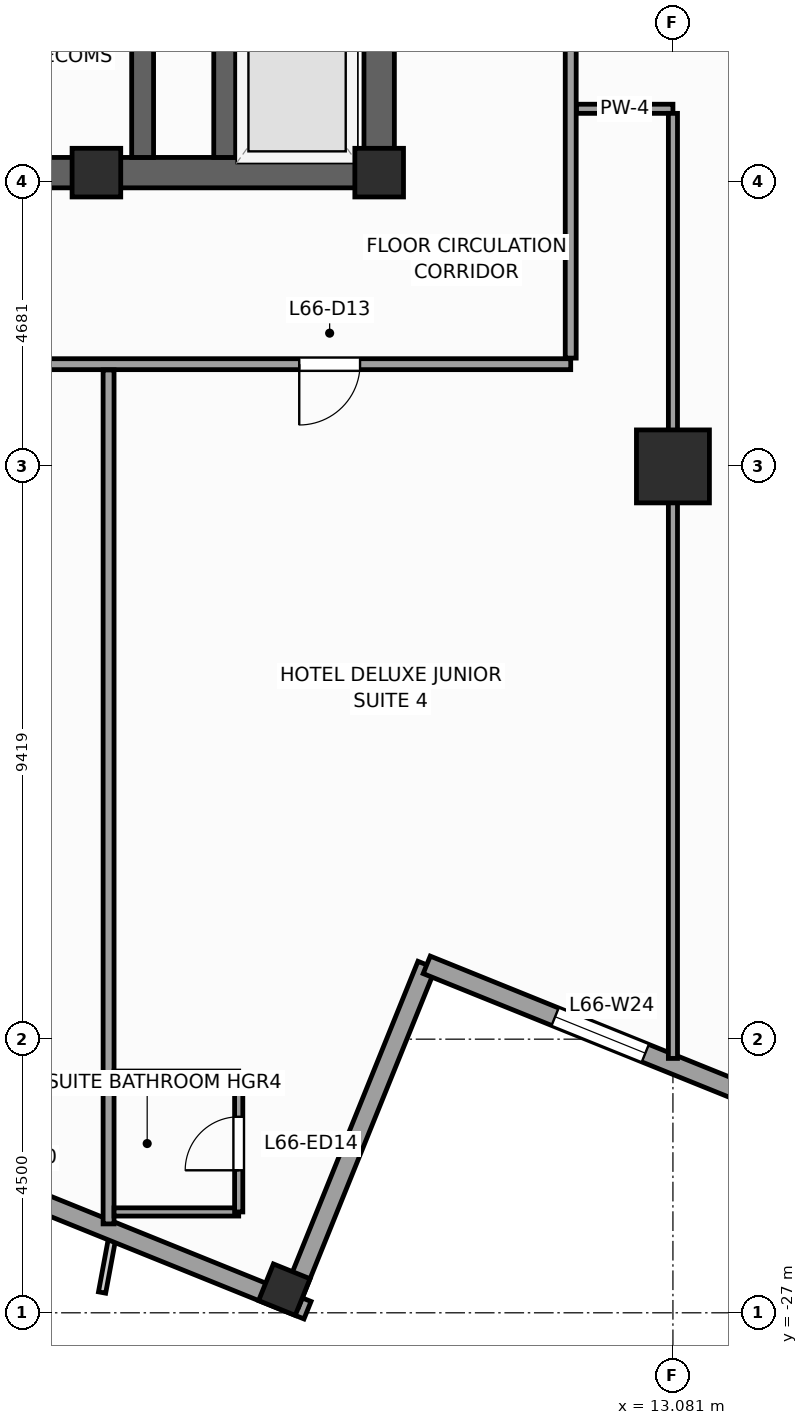
"""IFC4 building model, lengths in metres.
Left out: names, types, materials, properties, quantities, classifications, styles, units other than length and angle.
Written with IfcOpenShell. Run it as: python <this file> out.ifc"""

import sys

from ifc_helpers import new_model, si_unit, direction, frame, frame_2d, origin, origin_2d, place, context, subcontext, project, spatial, rectangle, extrude, source, transform, mapped, element, fill, save


model = new_model("IFC4")
c1 = context("Model", 3, precision=1e-05, world=origin(), true_north=direction((0.0, 1.0)))
c2 = subcontext(c1, "Body", "Model", "MODEL_VIEW")
j1 = project(units=[si_unit("LENGTHUNIT", "METRE"), si_unit("PLANEANGLEUNIT", "RADIAN")], contexts=[c1])
p1 = place(None, origin())
s1 = spatial("IfcSite", under=j1, at=p1, CompositionType="ELEMENT")
p2 = place(p1, origin())
s2 = spatial("IfcBuilding", under=s1, at=p2, CompositionType="ELEMENT")
p3 = place(p2, frame((0.0, 0.0, 272.4)))
s3 = spatial("IfcBuildingStorey", under=s2, at=p3, CompositionType="ELEMENT", Elevation=272.4)
p4 = place(p3, frame((-8.5, -8.25, 0.0), z_axis=(0.0, 0.0, 1.0), x_axis=(1.0, 0.0, 0.0)))
e1 = element("IfcWall", 1, at=p4, inside=s3, PredefinedType="SHEAR", context=c2, shape_type="SweptSolid", body=[
    extrude(rectangle(XDim=17.0, YDim=0.5, at=frame_2d((8.5, 0.0))), origin(), (0.0, 0.0, 1.0), 3.6),
])
p5 = place(p4, frame((7.85, 0.0, 0.0)))
e2 = element("IfcOpeningElement", 2, at=p5, cuts=e1, PredefinedType="OPENING", context=c2, shape_type="SweptSolid", body=[
    extrude(rectangle(XDim=1.3, YDim=2.2, at=frame_2d((0.65, 1.1))), frame((0.0, 0.26, 0.0), z_axis=(0.0, -1.0, 0.0), x_axis=(1.0, 0.0, 0.0)), (0.0, 0.0, 1.0), 0.52),
])
p6 = place(p3, frame((8.25, -8.0, 0.0), z_axis=(0.0, 0.0, 1.0), x_axis=(0.0, 1.0, 0.0)))
e3 = element("IfcWall", 3, at=p6, inside=s3, PredefinedType="SHEAR", context=c2, shape_type="SweptSolid", body=[
    extrude(rectangle(XDim=16.0, YDim=0.5, at=frame_2d((8.0, 0.0))), origin(), (0.0, 0.0, 1.0), 3.6),
])
p7 = place(p6, frame((4.69, 0.0, 0.0)))
e4 = element("IfcOpeningElement", 4, at=p7, cuts=e3, PredefinedType="OPENING", context=c2, shape_type="SweptSolid", body=[
    extrude(rectangle(XDim=1.3, YDim=2.2, at=frame_2d((0.65, 1.1))), frame((0.0, 0.26, 0.0), z_axis=(0.0, -1.0, 0.0), x_axis=(1.0, 0.0, 0.0)), (0.0, 0.0, 1.0), 0.52),
])
p8 = place(p3, frame((4.36, -8.0, 0.0), z_axis=(0.0, 0.0, 1.0), x_axis=(0.0, 1.0, 0.0)))
e5 = element("IfcWall", 5, at=p8, inside=s3, PredefinedType="SHEAR", context=c2, shape_type="SweptSolid", body=[
    extrude(rectangle(XDim=16.0, YDim=0.36, at=frame_2d((8.0, 0.0))), origin(), (0.0, 0.0, 1.0), 3.6),
])
p9 = place(p3, frame((5.71, -8.0, 0.0), z_axis=(0.0, 0.0, 1.0), x_axis=(0.0, 1.0, 0.0)))
e6 = element("IfcWall", 6, at=p9, inside=s3, PredefinedType="SHEAR", context=c2, shape_type="SweptSolid", body=[
    extrude(rectangle(XDim=2.54, YDim=0.36, at=frame_2d((1.27, 0.0))), origin(), (0.0, 0.0, 1.0), 3.6),
])
m1 = source(origin(), c2, "Body", "SweptSolid", [
    extrude(rectangle(XDim=0.8, YDim=0.8, at=origin_2d()), origin(), (0.0, 0.0, 1.0), 3.6),
])
for number, where, z_axis, x_axis in (
    (7, (8.25, -8.25, 0.0), (0.0, 0.0, 1.0), (1.0, 0.0, 0.0)),
    (8, (3.6, -8.25, 0.0), (0.0, 0.0, 1.0), (1.0, 0.0, 0.0)),
):
    element("IfcColumn", number, at=place(p3, frame(where, z_axis=z_axis, x_axis=x_axis)), inside=s3, PredefinedType="PILASTER", context=c2, shape_type="MappedRepresentation", body=[
        mapped(m1, transform((0.0, 0.0, 0.0), scale=1.0)),
    ])
m2 = source(origin(), c2, "Body", "SweptSolid", [
    extrude(rectangle(XDim=1.2, YDim=1.2, at=origin_2d()), origin(), (0.0, 0.0, 1.0), 3.6),
])
p10 = place(p3, frame((13.081, -13.081, 0.0), z_axis=(0.0, 0.0, 1.0), x_axis=(1.0, 0.0, 0.0)))
e9 = element("IfcColumn", 9, at=p10, inside=s3, PredefinedType="COLUMN", context=c2, shape_type="MappedRepresentation", body=[
    mapped(m2, transform((0.0, 0.0, 0.0), scale=1.0)),
])
m3 = source(origin(), c2, "Body", "SweptSolid", [
    extrude(rectangle(XDim=0.65, YDim=0.65, at=origin_2d()), origin(), (0.0, 0.0, 1.0), 3.6),
])
p11 = place(p3, frame((6.69, -26.62, 0.0), z_axis=(0.0, 0.0, 1.0), x_axis=(0.374606593416, 0.927183854567, 0.0)))
e10 = element("IfcColumn", 10, at=p11, inside=s3, PredefinedType="COLUMN", context=c2, shape_type="MappedRepresentation", body=[
    mapped(m3, transform((0.0, 0.0, 0.0), scale=1.0)),
])
p12 = place(p3, frame((-23.813, -14.479, 0.0), z_axis=(0.0, 0.0, 1.0), x_axis=(0.927182657188, -0.374609557019, 0.0)))
e11 = element("IfcWall", 11, at=p12, inside=s3, PredefinedType="STANDARD", context=c2, shape_type="SweptSolid", body=[
    extrude(rectangle(XDim=33.31, YDim=0.31, at=frame_2d((16.655, 0.0))), origin(), (0.0, 0.0, 1.0), 2.75),
])
p13 = place(p12, frame((3.197, 0.0, 0.47)))
e12 = element("IfcOpeningElement", 12, at=p13, cuts=e11, PredefinedType="OPENING", context=c2, shape_type="SweptSolid", body=[
    extrude(rectangle(XDim=1.6, YDim=2.1, at=frame_2d((0.8, 1.05))), frame((0.0, 0.165, 0.0), z_axis=(0.0, -1.0, 0.0), x_axis=(1.0, 0.0, 0.0)), (0.0, 0.0, 1.0), 0.33),
])
p14 = place(p12, frame((8.86, 0.0, 0.47)))
e13 = element("IfcOpeningElement", 13, at=p14, cuts=e11, PredefinedType="OPENING", context=c2, shape_type="SweptSolid", body=[
    extrude(rectangle(XDim=1.6, YDim=2.1, at=frame_2d((0.8, 1.05))), frame((0.0, 0.165, 0.0), z_axis=(0.0, -1.0, 0.0), x_axis=(1.0, 0.0, 0.0)), (0.0, 0.0, 1.0), 0.33),
])
p15 = place(p12, frame((14.439, 0.0, 0.47)))
e14 = element("IfcOpeningElement", 14, at=p15, cuts=e11, PredefinedType="OPENING", context=c2, shape_type="SweptSolid", body=[
    extrude(rectangle(XDim=1.6, YDim=2.1, at=frame_2d((0.8, 1.05))), frame((0.0, 0.165, 0.0), z_axis=(0.0, -1.0, 0.0), x_axis=(1.0, 0.0, 0.0)), (0.0, 0.0, 1.0), 0.33),
])
p16 = place(p12, frame((22.601, 0.0, 0.47)))
e15 = element("IfcOpeningElement", 15, at=p16, cuts=e11, PredefinedType="OPENING", context=c2, shape_type="SweptSolid", body=[
    extrude(rectangle(XDim=1.6, YDim=2.1, at=frame_2d((0.8, 1.05))), frame((0.0, 0.165, 0.0), z_axis=(0.0, -1.0, 0.0), x_axis=(1.0, 0.0, 0.0)), (0.0, 0.0, 1.0), 0.33),
])
p17 = place(p12, frame((27.097, 0.0, 0.47)))
e16 = element("IfcOpeningElement", 16, at=p17, cuts=e11, PredefinedType="OPENING", context=c2, shape_type="SweptSolid", body=[
    extrude(rectangle(XDim=1.6, YDim=2.1, at=frame_2d((0.8, 1.05))), frame((0.0, 0.165, 0.0), z_axis=(0.0, -1.0, 0.0), x_axis=(1.0, 0.0, 0.0)), (0.0, 0.0, 1.0), 0.33),
])
p18 = place(p3, frame((6.784, -26.841, 0.0), z_axis=(0.0, 0.0, 1.0), x_axis=(0.374636620962, 0.927171722085, 0.0)))
e17 = element("IfcWall", 17, at=p18, inside=s3, PredefinedType="STANDARD", context=c2, shape_type="SweptSolid", body=[
    extrude(rectangle(XDim=6.0, YDim=0.31, at=frame_2d((3.0, 0.0))), origin(), (0.0, 0.0, 1.0), 2.65),
])
p19 = place(p3, frame((9.032, -21.278, 0.0), z_axis=(0.0, 0.0, 1.0), x_axis=(0.927185411764, -0.374602739196, 0.0)))
e18 = element("IfcWall", 18, at=p19, inside=s3, PredefinedType="STANDARD", context=c2, shape_type="SweptSolid", body=[
    extrude(rectangle(XDim=6.155, YDim=0.31, at=frame_2d((3.078, 0.0))), origin(), (0.0, 0.0, 1.0), 3.35),
])
p20 = place(p19, frame((2.278, 0.0, 0.47)))
e19 = element("IfcOpeningElement", 19, at=p20, cuts=e18, PredefinedType="OPENING", context=c2, shape_type="SweptSolid", body=[
    extrude(rectangle(XDim=1.6, YDim=2.1, at=frame_2d((0.8, 1.05))), frame((0.0, 0.165, 0.0), z_axis=(0.0, -1.0, 0.0), x_axis=(1.0, 0.0, 0.0)), (0.0, 0.0, 1.0), 0.33),
])
p21 = place(p3, frame((-10.3, -11.4, 0.0), z_axis=(0.0, 0.0, 1.0), x_axis=(1.0, 0.0, 0.0)))
e20 = element("IfcWall", 20, at=p21, inside=s3, PredefinedType="PARTITIONING", context=c2, shape_type="SweptSolid", body=[
    extrude(rectangle(XDim=21.7, YDim=0.18, at=frame_2d((10.85, 0.0))), origin(), (0.0, 0.0, 1.0), 3.35),
])
p22 = place(p21, frame((1.605, 0.0, 0.0)))
e21 = element("IfcOpeningElement", 21, at=p22, cuts=e20, PredefinedType="OPENING", context=c2, shape_type="SweptSolid", body=[
    extrude(rectangle(XDim=0.95, YDim=2.1, at=frame_2d((0.475, 1.05))), frame((0.0, 0.1, 0.0), z_axis=(0.0, -1.0, 0.0), x_axis=(1.0, 0.0, 0.0)), (0.0, 0.0, 1.0), 0.2),
])
p23 = place(p21, frame((17.236, 0.0, 0.0)))
e22 = element("IfcOpeningElement", 22, at=p23, cuts=e20, PredefinedType="OPENING", context=c2, shape_type="SweptSolid", body=[
    extrude(rectangle(XDim=1.0, YDim=2.15, at=frame_2d((0.5, 1.075))), frame((0.0, 0.1, 0.0), z_axis=(0.0, -1.0, 0.0), x_axis=(1.0, 0.0, 0.0)), (0.0, 0.0, 1.0), 0.2),
])
p24 = place(p21, frame((9.8, 0.0, 0.0)))
e23 = element("IfcOpeningElement", 23, at=p24, cuts=e20, PredefinedType="OPENING", context=c2, shape_type="SweptSolid", body=[
    extrude(rectangle(XDim=1.0, YDim=2.15, at=frame_2d((0.5, 1.075))), frame((0.0, 0.1, 0.0), z_axis=(0.0, -1.0, 0.0), x_axis=(1.0, 0.0, 0.0)), (0.0, 0.0, 1.0), 0.2),
])
p25 = place(p3, frame((11.4, -11.3, 0.0), z_axis=(0.0, 0.0, 1.0), x_axis=(0.0, 1.0, 0.0)))
e24 = element("IfcWall", 24, at=p25, inside=s3, PredefinedType="PARTITIONING", context=c2, shape_type="SweptSolid", body=[
    extrude(rectangle(XDim=21.5, YDim=0.18, at=frame_2d((10.75, 0.0))), origin(), (0.0, 0.0, 1.0), 3.35),
])
p26 = place(p25, frame((17.536, 0.0, 0.0)))
e25 = element("IfcOpeningElement", 25, at=p26, cuts=e24, PredefinedType="OPENING", context=c2, shape_type="SweptSolid", body=[
    extrude(rectangle(XDim=1.0, YDim=2.15, at=frame_2d((0.5, 1.075))), frame((0.0, 0.1, 0.0), z_axis=(0.0, -1.0, 0.0), x_axis=(1.0, 0.0, 0.0)), (0.0, 0.0, 1.0), 0.2),
])
p27 = place(p25, frame((10.8, 0.0, 0.0)))
e26 = element("IfcOpeningElement", 26, at=p27, cuts=e24, PredefinedType="OPENING", context=c2, shape_type="SweptSolid", body=[
    extrude(rectangle(XDim=1.0, YDim=2.15, at=frame_2d((0.5, 1.075))), frame((0.0, 0.1, 0.0), z_axis=(0.0, -1.0, 0.0), x_axis=(1.0, 0.0, 0.0)), (0.0, 0.0, 1.0), 0.2),
])
p28 = place(p25, frame((5.4, 0.0, 0.0)))
e27 = element("IfcOpeningElement", 27, at=p28, cuts=e24, PredefinedType="OPENING", context=c2, shape_type="SweptSolid", body=[
    extrude(rectangle(XDim=1.0, YDim=2.15, at=frame_2d((0.5, 1.075))), frame((0.0, 0.1, 0.0), z_axis=(0.0, -1.0, 0.0), x_axis=(1.0, 0.0, 0.0)), (0.0, 0.0, 1.0), 0.2),
])
p29 = place(p3, frame((3.8, -11.495, 0.0), z_axis=(0.0, 0.0, 1.0), x_axis=(0.0, -1.0, 0.0)))
e28 = element("IfcWall", 28, at=p29, inside=s3, PredefinedType="PARTITIONING", context=c2, shape_type="SweptSolid", body=[
    extrude(rectangle(XDim=14.043, YDim=0.18, at=frame_2d((7.021, 0.0))), origin(), (0.0, 0.0, 1.0), 3.35),
])
p30 = place(p3, frame((11.495, -7.2, 0.0), z_axis=(0.0, 0.0, 1.0), x_axis=(1.0, 0.0, 0.0)))
e29 = element("IfcWall", 29, at=p30, inside=s3, PredefinedType="PARTITIONING", context=c2, shape_type="SweptSolid", body=[
    extrude(rectangle(XDim=1.586, YDim=0.15, at=frame_2d((0.793, 0.0))), origin(), (0.0, 0.0, 1.0), 3.35),
])
p31 = place(p3, frame((13.081, -7.275, 0.0), z_axis=(0.0, 0.0, 1.0), x_axis=(0.0, -1.0, 0.0)))
e30 = element("IfcWall", 30, at=p31, inside=s3, PredefinedType="PARTITIONING", context=c2, shape_type="SweptSolid", body=[
    extrude(rectangle(XDim=15.542, YDim=0.15, at=frame_2d((7.771, 0.0))), origin(), (0.0, 0.0, 1.0), 2.45),
])
p32 = place(p3, frame((3.89, -25.342, 0.0), z_axis=(0.0, 0.0, 1.0), x_axis=(1.0, 0.0, 0.0)))
e31 = element("IfcWall", 31, at=p32, inside=s3, PredefinedType="PARTITIONING", context=c2, shape_type="SweptSolid", body=[
    extrude(rectangle(XDim=2.05, YDim=0.135, at=frame_2d((1.025, 0.0))), origin(), (0.0, 0.0, 1.0), 2.75),
])
p33 = place(p3, frame((5.94, -25.342, 0.0), z_axis=(0.0, 0.0, 1.0), x_axis=(0.0, 1.0, 0.0)))
e32 = element("IfcWall", 32, at=p33, inside=s3, PredefinedType="PARTITIONING", context=c2, shape_type="SweptSolid", body=[
    extrude(rectangle(XDim=2.25, YDim=0.135, at=frame_2d((1.125, 0.0))), origin(), (0.0, 0.0, 1.0), 3.35),
])
p34 = place(p33, frame((0.685, 0.0, 0.0)))
e33 = element("IfcOpeningElement", 33, at=p34, cuts=e32, PredefinedType="OPENING", context=c2, shape_type="SweptSolid", body=[
    extrude(rectangle(XDim=0.88, YDim=2.1, at=frame_2d((0.44, 1.05))), frame((0.0, 0.078, 0.0), z_axis=(0.0, -1.0, 0.0), x_axis=(1.0, 0.0, 0.0)), (0.0, 0.0, 1.0), 0.155),
])
p35 = place(p3, frame((3.89, -23.092, 0.0), z_axis=(0.0, 0.0, 1.0), x_axis=(1.0, 0.0, 0.0)))
e34 = element("IfcWall", 34, at=p35, inside=s3, PredefinedType="PARTITIONING", context=c2, shape_type="SweptSolid", body=[
    extrude(rectangle(XDim=2.05, YDim=0.135, at=frame_2d((1.025, 0.0))), origin(), (0.0, 0.0, 1.0), 2.95),
])
m4 = source(origin(), c2, "Body", "SweptSolid", [
    extrude(rectangle(XDim=1.6, YDim=2.1, at=frame_2d((0.8, 1.05))), frame((0.0, 0.03, 0.0), z_axis=(0.0, -1.0, 0.0), x_axis=(1.0, 0.0, 0.0)), (0.0, 0.0, 1.0), 0.06),
])
p36 = place(p20, origin())
e35 = element("IfcWindow", 35, at=p36, inside=s3, PartitioningType="SINGLE_PANEL", PredefinedType="WINDOW", context=c2, shape_type="MappedRepresentation", body=[
    mapped(m4, transform((0.0, 0.0, 0.0), scale=1.0)),
])
fill(e19, e35)
m5 = source(origin(), c2, "Body", "SweptSolid", [
    extrude(rectangle(XDim=1.0, YDim=2.15, at=frame_2d((0.5, 1.075))), frame((0.0, 0.025, 0.0), z_axis=(0.0, -1.0, 0.0), x_axis=(1.0, 0.0, 0.0)), (0.0, 0.0, 1.0), 0.05),
])
p37 = place(p23, frame((1.0, 0.0, 0.0), z_axis=(0.0, 0.0, 1.0), x_axis=(-1.0, 0.0, 0.0)))
e36 = element("IfcDoor", 36, at=p37, inside=s3, OperationType="SINGLE_SWING_LEFT", PredefinedType="DOOR", context=c2, shape_type="MappedRepresentation", body=[
    mapped(m5, transform((0.0, 0.0, 0.0), scale=1.0)),
])
fill(e22, e36)
m6 = source(origin(), c2, "Body", "SweptSolid", [
    extrude(rectangle(XDim=0.88, YDim=2.1, at=frame_2d((0.44, 1.05))), frame((0.0, 0.025, 0.0), z_axis=(0.0, -1.0, 0.0), x_axis=(1.0, 0.0, 0.0)), (0.0, 0.0, 1.0), 0.05),
])
p38 = place(p34, origin())
e37 = element("IfcDoor", 37, at=p38, inside=s3, OperationType="SINGLE_SWING_LEFT", PredefinedType="DOOR", context=c2, shape_type="MappedRepresentation", body=[
    mapped(m6, transform((0.0, 0.0, 0.0), scale=1.0)),
])
fill(e33, e37)
save(model, sys.argv[1])
